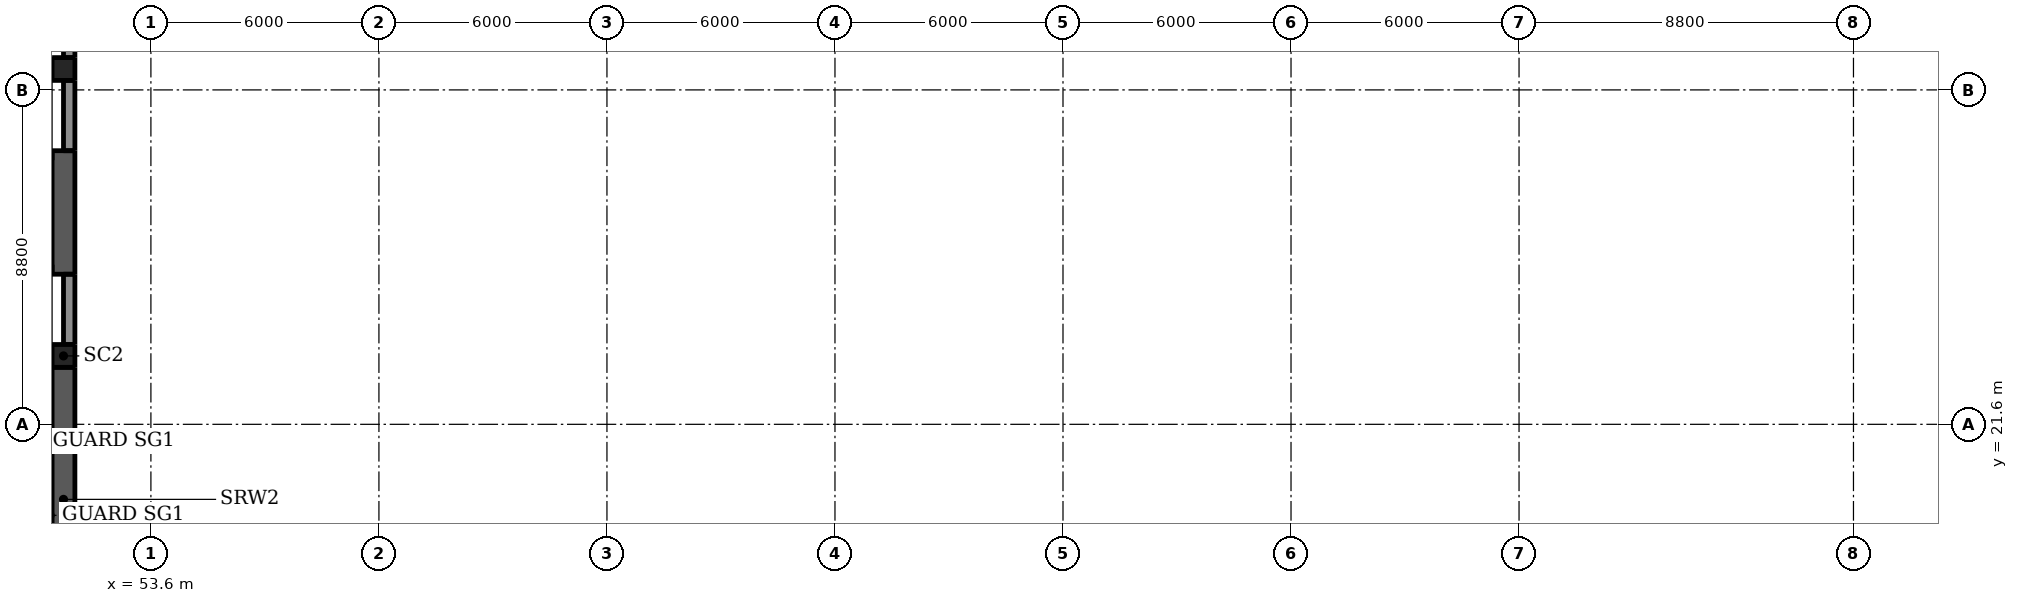
"""IFC4 building model, lengths in metres.
Left out: names, types, materials, properties, quantities, classifications, styles, units other than length and angle.
Written with IfcOpenShell. Run it as: python <this file> out.ifc"""

import sys

from ifc_helpers import new_model, si_unit, direction, frame, frame_2d, origin, origin_2d, place, context, subcontext, project, spatial, rectangle, extrude, element, fill, save


model = new_model("IFC4")
c1 = context("Model", 3, precision=1e-05, world=origin(), true_north=direction((0.0, 1.0)))
c2 = subcontext(c1, "Body", "Model", "MODEL_VIEW")
j1 = project(units=[si_unit("LENGTHUNIT", "METRE"), si_unit("PLANEANGLEUNIT", "RADIAN")], contexts=[c1])
p1 = place(None, origin())
s1 = spatial("IfcSite", under=j1, at=p1, CompositionType="ELEMENT")
p2 = place(p1, origin())
s2 = spatial("IfcBuilding", under=s1, at=p2, CompositionType="ELEMENT")
p3 = place(p2, frame((0.0, 0.0, 19.0)))
s3 = spatial("IfcBuildingStorey", under=s2, at=p3, CompositionType="ELEMENT", Elevation=19.0)
for number, where, z_axis, x_axis in (
    (1, (59.6, 20.6, 0.0), (0.0, 0.0, 1.0), (1.0, 0.0, 0.0)),
    (2, (65.6, 20.6, 0.0), (0.0, 0.0, 1.0), (1.0, 0.0, 0.0)),
):
    element("IfcColumn", number, at=place(p3, frame(where, z_axis=z_axis, x_axis=x_axis)), inside=s3, PredefinedType="COLUMN", context=c2, shape_type="SweptSolid", body=[
        extrude(rectangle(XDim=1.2, YDim=1.2, at=origin_2d()), origin(), (0.0, 0.0, 1.0), 4.25),
    ])
for number, where, z_axis, x_axis in (
    (3, (71.6, 20.6, 0.0), (0.0, 0.0, 1.0), (1.0, 0.0, 0.0)),
    (4, (77.6, 20.6, 0.0), (0.0, 0.0, 1.0), (1.0, 0.0, 0.0)),
    (5, (83.6, 20.6, 0.0), (0.0, 0.0, 1.0), (1.0, 0.0, 0.0)),
):
    element("IfcColumn", number, at=place(p3, frame(where, z_axis=z_axis, x_axis=x_axis)), inside=s3, PredefinedType="COLUMN", context=c2, shape_type="SweptSolid", body=[
        extrude(rectangle(XDim=1.2, YDim=1.2, at=origin_2d()), origin(), (0.0, 0.0, 1.0), 4.5),
    ])
for number, where, z_axis, x_axis in (
    (6, (89.6, 20.6, 0.0), (0.0, 0.0, 1.0), (1.0, 0.0, 0.0)),
    (7, (99.4, 30.4, 0.0), (0.0, 0.0, 1.0), (1.0, 0.0, 0.0)),
    (8, (52.6, 30.4, 0.0), (0.0, 0.0, 1.0), (1.0, 0.0, 0.0)),
):
    element("IfcColumn", number, at=place(p3, frame(where, z_axis=z_axis, x_axis=x_axis)), inside=s3, PredefinedType="COLUMN", context=c2, shape_type="SweptSolid", body=[
        extrude(rectangle(XDim=1.2, YDim=1.2, at=origin_2d()), origin(), (0.0, 0.0, 1.0), 4.25),
    ])
for number, where, z_axis, x_axis in (
    (9, (55.2, 23.2, 0.0), (0.0, 0.0, 1.0), (1.0, 0.0, 0.0)),
    (10, (96.8, 23.2, 0.0), (0.0, 0.0, 1.0), (1.0, 0.0, 0.0)),
):
    element("IfcColumn", number, at=place(p3, frame(where, z_axis=z_axis, x_axis=x_axis)), inside=s3, PredefinedType="COLUMN", context=c2, shape_type="SweptSolid", body=[
        extrude(rectangle(XDim=3.2, YDim=3.2, at=origin_2d()), origin(), (0.0, 0.0, 1.0), 4.25),
    ])
for number, where, z_axis, x_axis in (
    (11, (51.3, 23.4, -0.3), (0.0, 0.0, 1.0), (1.0, 0.0, 0.0)),
    (12, (51.3, 30.95, -0.3), (0.0, 0.0, 1.0), (1.0, 0.0, 0.0)),
):
    element("IfcColumn", number, at=place(p3, frame(where, z_axis=z_axis, x_axis=x_axis)), inside=s3, PredefinedType="COLUMN", context=c2, shape_type="SweptSolid", body=[
        extrude(rectangle(XDim=0.6, YDim=0.6, at=origin_2d()), origin(), (0.0, 0.0, 1.0), 4.35),
    ])
p4 = place(p3, frame((51.3, 16.15, -0.3), z_axis=(0.0, 0.0, 1.0), x_axis=(0.0, 1.0, 0.0)))
e13 = element("IfcWall", 13, at=p4, inside=s3, PredefinedType="SHEAR", context=c2, shape_type="SweptSolid", body=[
    extrude(rectangle(XDim=6.95, YDim=0.6, at=frame_2d((3.475, 0.0))), origin(), (0.0, 0.0, 1.0), 4.8),
])
p5 = place(p3, frame((51.3, 25.55, -0.3), z_axis=(0.0, 0.0, 1.0), x_axis=(0.0, 1.0, 0.0)))
e14 = element("IfcWall", 14, at=p5, inside=s3, PredefinedType="SHEAR", context=c2, shape_type="SweptSolid", body=[
    extrude(rectangle(XDim=3.25, YDim=0.6, at=frame_2d((1.625, 0.0))), origin(), (0.0, 0.0, 1.0), 4.35),
])
p6 = place(p3, frame((52.125, 20.0, 0.0), z_axis=(0.0, 0.0, 1.0), x_axis=(0.0, 1.0, 0.0)))
e15 = element("IfcWall", 15, at=p6, inside=s3, PredefinedType="SOLIDWALL", context=c2, shape_type="SweptSolid", body=[
    extrude(rectangle(XDim=9.8, YDim=0.25, at=frame_2d((4.9, 0.0))), origin(), (0.0, 0.0, 1.0), 4.25),
])
p7 = place(p3, frame((52.125, 31.0, 0.0), z_axis=(0.0, 0.0, 1.0), x_axis=(0.0, 1.0, 0.0)))
e16 = element("IfcWall", 16, at=p7, inside=s3, PredefinedType="SOLIDWALL", context=c2, shape_type="SweptSolid", body=[
    extrude(rectangle(XDim=4.8, YDim=0.25, at=frame_2d((2.4, 0.0))), origin(), (0.0, 0.0, 1.0), 4.25),
])
p8 = place(p3, frame((51.45, 31.25, 0.0), z_axis=(0.0, 0.0, 1.0), x_axis=(0.0, 1.0, 0.0)))
e17 = element("IfcWall", 17, at=p8, inside=s3, PredefinedType="SOLIDWALL", context=c2, shape_type="SweptSolid", body=[
    extrude(rectangle(XDim=6.95, YDim=0.3, at=frame_2d((3.475, 0.0))), origin(), (0.0, 0.0, 1.0), 3.15),
])
p9 = place(p3, frame((51.45, 23.7, 0.0), z_axis=(0.0, 0.0, 1.0), x_axis=(0.0, 1.0, 0.0)))
e18 = element("IfcWall", 18, at=p9, inside=s3, PredefinedType="SOLIDWALL", context=c2, shape_type="SweptSolid", body=[
    extrude(rectangle(XDim=1.85, YDim=0.3, at=frame_2d((0.925, 0.0))), origin(), (0.0, 0.0, 1.0), 3.15),
])
p10 = place(p3, frame((51.45, 28.8, 0.0), z_axis=(0.0, 0.0, 1.0), x_axis=(0.0, 1.0, 0.0)))
e19 = element("IfcWall", 19, at=p10, inside=s3, PredefinedType="SOLIDWALL", context=c2, shape_type="SweptSolid", body=[
    extrude(rectangle(XDim=1.85, YDim=0.3, at=frame_2d((0.925, 0.0))), origin(), (0.0, 0.0, 1.0), 3.15),
])
p11 = place(p3, frame((53.2, 30.4, 0.0), z_axis=(0.0, 0.0, 1.0), x_axis=(1.0, 0.0, 0.0)))
e20 = element("IfcWall", 20, at=p11, inside=s3, PredefinedType="PARTITIONING", context=c2, shape_type="SweptSolid", body=[
    extrude(rectangle(XDim=5.95, YDim=0.15, at=frame_2d((2.975, 0.0))), origin(), (0.0, 0.0, 1.0), 3.415),
])
p12 = place(p3, frame((59.15, 30.4, 0.0), z_axis=(0.0, 0.0, 1.0), x_axis=(1.0, 0.0, 0.0)))
e21 = element("IfcWall", 21, at=p12, inside=s3, PredefinedType="PARTITIONING", context=c2, shape_type="SweptSolid", body=[
    extrude(rectangle(XDim=0.9, YDim=0.15, at=frame_2d((0.45, 0.0))), origin(), (0.0, 0.0, 1.0), 2.947),
])
p13 = place(p3, frame((60.05, 30.4, 0.0), z_axis=(0.0, 0.0, 1.0), x_axis=(1.0, 0.0, 0.0)))
e22 = element("IfcWall", 22, at=p13, inside=s3, PredefinedType="PARTITIONING", context=c2, shape_type="SweptSolid", body=[
    extrude(rectangle(XDim=5.1, YDim=0.15, at=frame_2d((2.55, 0.0))), origin(), (0.0, 0.0, 1.0), 4.25),
])
p14 = place(p13, frame((1.65, 0.0, 0.0)))
e23 = element("IfcOpeningElement", 23, at=p14, cuts=e22, PredefinedType="OPENING", context=c2, shape_type="SweptSolid", body=[
    extrude(rectangle(XDim=1.8, YDim=2.1, at=frame_2d((0.9, 1.05))), frame((0.0, 0.085, 0.0), z_axis=(0.0, -1.0, 0.0), x_axis=(1.0, 0.0, 0.0)), (0.0, 0.0, 1.0), 0.17),
])
p15 = place(p3, frame((65.15, 30.4, 0.0), z_axis=(0.0, 0.0, 1.0), x_axis=(1.0, 0.0, 0.0)))
e24 = element("IfcWall", 24, at=p15, inside=s3, PredefinedType="PARTITIONING", context=c2, shape_type="SweptSolid", body=[
    extrude(rectangle(XDim=0.9, YDim=0.15, at=frame_2d((0.45, 0.0))), origin(), (0.0, 0.0, 1.0), 2.95),
])
p16 = place(p3, frame((66.05, 30.4, 0.0), z_axis=(0.0, 0.0, 1.0), x_axis=(1.0, 0.0, 0.0)))
e25 = element("IfcWall", 25, at=p16, inside=s3, PredefinedType="PARTITIONING", context=c2, shape_type="SweptSolid", body=[
    extrude(rectangle(XDim=5.1, YDim=0.15, at=frame_2d((2.55, 0.0))), origin(), (0.0, 0.0, 1.0), 4.25),
])
p17 = place(p3, frame((71.15, 30.4, 0.0), z_axis=(0.0, 0.0, 1.0), x_axis=(1.0, 0.0, 0.0)))
e26 = element("IfcWall", 26, at=p17, inside=s3, PredefinedType="PARTITIONING", context=c2, shape_type="SweptSolid", body=[
    extrude(rectangle(XDim=0.9, YDim=0.15, at=frame_2d((0.45, 0.0))), origin(), (0.0, 0.0, 1.0), 2.95),
])
p18 = place(p3, frame((72.05, 30.4, 0.0), z_axis=(0.0, 0.0, 1.0), x_axis=(1.0, 0.0, 0.0)))
e27 = element("IfcWall", 27, at=p18, inside=s3, PredefinedType="PARTITIONING", context=c2, shape_type="SweptSolid", body=[
    extrude(rectangle(XDim=5.1, YDim=0.15, at=frame_2d((2.55, 0.0))), origin(), (0.0, 0.0, 1.0), 4.25),
])
p19 = place(p18, frame((0.15, 0.0, 0.0)))
e28 = element("IfcOpeningElement", 28, at=p19, cuts=e27, PredefinedType="OPENING", context=c2, shape_type="SweptSolid", body=[
    extrude(rectangle(XDim=1.8, YDim=2.1, at=frame_2d((0.9, 1.05))), frame((0.0, 0.085, 0.0), z_axis=(0.0, -1.0, 0.0), x_axis=(1.0, 0.0, 0.0)), (0.0, 0.0, 1.0), 0.17),
])
p20 = place(p3, frame((77.15, 30.4, 0.0), z_axis=(0.0, 0.0, 1.0), x_axis=(1.0, 0.0, 0.0)))
e29 = element("IfcWall", 29, at=p20, inside=s3, PredefinedType="PARTITIONING", context=c2, shape_type="SweptSolid", body=[
    extrude(rectangle(XDim=0.9, YDim=0.15, at=frame_2d((0.45, 0.0))), origin(), (0.0, 0.0, 1.0), 2.95),
])
p21 = place(p3, frame((78.05, 30.4, 0.0), z_axis=(0.0, 0.0, 1.0), x_axis=(1.0, 0.0, 0.0)))
e30 = element("IfcWall", 30, at=p21, inside=s3, PredefinedType="PARTITIONING", context=c2, shape_type="SweptSolid", body=[
    extrude(rectangle(XDim=5.1, YDim=0.15, at=frame_2d((2.55, 0.0))), origin(), (0.0, 0.0, 1.0), 4.25),
])
p22 = place(p3, frame((83.15, 30.4, 0.0), z_axis=(0.0, 0.0, 1.0), x_axis=(1.0, 0.0, 0.0)))
e31 = element("IfcWall", 31, at=p22, inside=s3, PredefinedType="PARTITIONING", context=c2, shape_type="SweptSolid", body=[
    extrude(rectangle(XDim=0.9, YDim=0.15, at=frame_2d((0.45, 0.0))), origin(), (0.0, 0.0, 1.0), 2.95),
])
p23 = place(p3, frame((84.05, 30.4, 0.0), z_axis=(0.0, 0.0, 1.0), x_axis=(1.0, 0.0, 0.0)))
e32 = element("IfcWall", 32, at=p23, inside=s3, PredefinedType="PARTITIONING", context=c2, shape_type="SweptSolid", body=[
    extrude(rectangle(XDim=5.1, YDim=0.15, at=frame_2d((2.55, 0.0))), origin(), (0.0, 0.0, 1.0), 4.25),
])
p24 = place(p23, frame((0.15, 0.0, 0.0)))
e33 = element("IfcOpeningElement", 33, at=p24, cuts=e32, PredefinedType="OPENING", context=c2, shape_type="SweptSolid", body=[
    extrude(rectangle(XDim=1.8, YDim=2.1, at=frame_2d((0.9, 1.05))), frame((0.0, 0.085, 0.0), z_axis=(0.0, -1.0, 0.0), x_axis=(1.0, 0.0, 0.0)), (0.0, 0.0, 1.0), 0.17),
])
p25 = place(p3, frame((89.15, 30.4, 0.0), z_axis=(0.0, 0.0, 1.0), x_axis=(1.0, 0.0, 0.0)))
e34 = element("IfcWall", 34, at=p25, inside=s3, PredefinedType="PARTITIONING", context=c2, shape_type="SweptSolid", body=[
    extrude(rectangle(XDim=0.9, YDim=0.15, at=frame_2d((0.45, 0.0))), origin(), (0.0, 0.0, 1.0), 2.947),
])
p26 = place(p3, frame((90.05, 30.4, 0.0), z_axis=(0.0, 0.0, 1.0), x_axis=(1.0, 0.0, 0.0)))
e35 = element("IfcWall", 35, at=p26, inside=s3, PredefinedType="PARTITIONING", context=c2, shape_type="SweptSolid", body=[
    extrude(rectangle(XDim=8.75, YDim=0.15, at=frame_2d((4.375, 0.0))), origin(), (0.0, 0.0, 1.0), 3.415),
])
p27 = place(p3, frame((59.6, 30.475, 0.0), z_axis=(0.0, 0.0, 1.0), x_axis=(0.0, 1.0, 0.0)))
e36 = element("IfcWall", 36, at=p27, inside=s3, PredefinedType="PARTITIONING", context=c2, shape_type="SweptSolid", body=[
    extrude(rectangle(XDim=5.779, YDim=0.15, at=frame_2d((2.89, 0.0))), origin(), (0.0, 0.0, 1.0), 2.947),
])
for number, where, z_axis, x_axis in (
    (37, (65.6, 21.2, 0.0), (0.0, 0.0, 1.0), (0.0, 1.0, 0.0)),
    (38, (77.6, 21.2, 0.0), (0.0, 0.0, 1.0), (0.0, 1.0, 0.0)),
):
    element("IfcWall", number, at=place(p3, frame(where, z_axis=z_axis, x_axis=x_axis)), inside=s3, PredefinedType="PARTITIONING", context=c2, shape_type="SweptSolid", body=[
        extrude(rectangle(XDim=9.125, YDim=0.1, at=frame_2d((4.562, 0.0))), origin(), (0.0, 0.0, 1.0), 2.95),
    ])
p28 = place(p3, frame((89.6, 30.475, 0.0), z_axis=(0.0, 0.0, 1.0), x_axis=(0.0, 1.0, 0.0)))
e39 = element("IfcWall", 39, at=p28, inside=s3, PredefinedType="PARTITIONING", context=c2, shape_type="SweptSolid", body=[
    extrude(rectangle(XDim=5.475, YDim=0.15, at=frame_2d((2.737, 0.0))), origin(), (0.0, 0.0, 1.0), 2.947),
])
p29 = place(p14, origin())
e40 = element("IfcDoor", 40, at=p29, inside=s3, OperationType="DOUBLE_DOOR_SINGLE_SWING", PredefinedType="DOOR", context=c2, shape_type="SweptSolid", body=[
    extrude(rectangle(XDim=1.8, YDim=2.1, at=frame_2d((0.9, 1.05))), frame((0.0, 0.025, 0.0), z_axis=(0.0, -1.0, 0.0), x_axis=(1.0, 0.0, 0.0)), (0.0, 0.0, 1.0), 0.05),
])
fill(e23, e40)
p30 = place(p19, origin())
e41 = element("IfcDoor", 41, at=p30, inside=s3, OperationType="DOUBLE_DOOR_SINGLE_SWING", PredefinedType="DOOR", context=c2, shape_type="SweptSolid", body=[
    extrude(rectangle(XDim=1.8, YDim=2.1, at=frame_2d((0.9, 1.05))), frame((0.0, 0.025, 0.0), z_axis=(0.0, -1.0, 0.0), x_axis=(1.0, 0.0, 0.0)), (0.0, 0.0, 1.0), 0.05),
])
fill(e28, e41)
p31 = place(p24, origin())
e42 = element("IfcDoor", 42, at=p31, inside=s3, OperationType="DOUBLE_DOOR_SINGLE_SWING", PredefinedType="DOOR", context=c2, shape_type="SweptSolid", body=[
    extrude(rectangle(XDim=1.8, YDim=2.1, at=frame_2d((0.9, 1.05))), frame((0.0, 0.025, 0.0), z_axis=(0.0, -1.0, 0.0), x_axis=(1.0, 0.0, 0.0)), (0.0, 0.0, 1.0), 0.05),
])
fill(e33, e42)
save(model, sys.argv[1])
